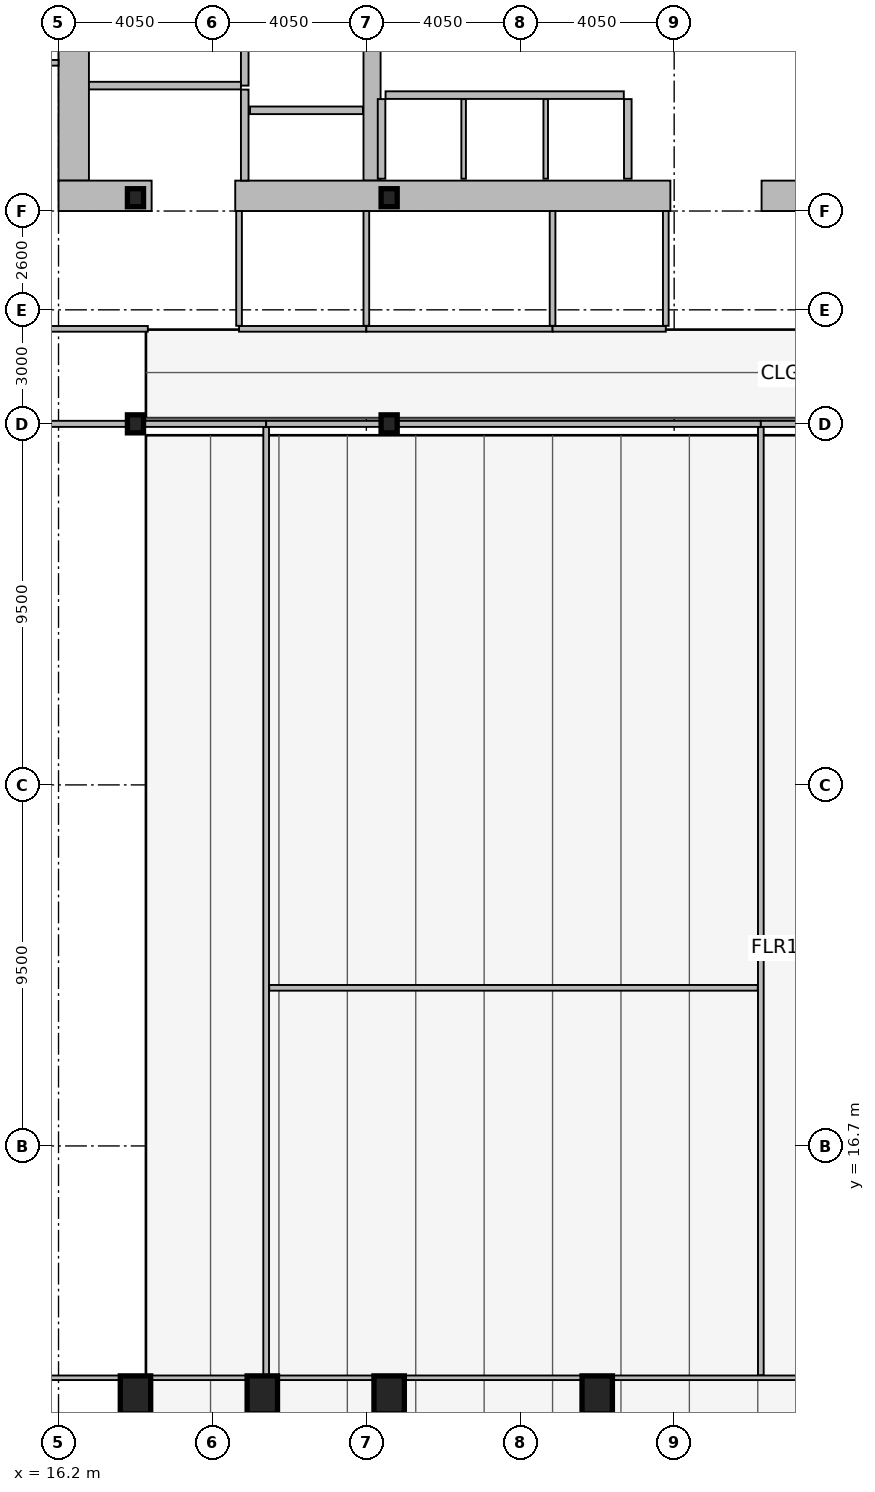
"""IFC4 building model, lengths in metres.
Left out: names, types, materials, properties, quantities, classifications, styles, units other than length and angle.
Written with IfcOpenShell. Run it as: python <this file> out.ifc"""

import sys

from ifc_helpers import new_model, si_unit, direction, frame, frame_2d, origin, origin_2d, place, context, subcontext, project, spatial, rectangle, hollow_rectangle, i_section, extrude, element, fill, save


model = new_model("IFC4")
c1 = context("Model", 3, precision=1e-05, world=origin(), true_north=direction((0.0, 1.0)))
c2 = subcontext(c1, "Body", "Model", "MODEL_VIEW")
j1 = project(units=[si_unit("LENGTHUNIT", "METRE"), si_unit("PLANEANGLEUNIT", "RADIAN")], contexts=[c1])
p1 = place(None, origin())
s1 = spatial("IfcSite", under=j1, at=p1, CompositionType="ELEMENT")
p2 = place(p1, origin())
s2 = spatial("IfcBuilding", under=s1, at=p2, CompositionType="ELEMENT")
p3 = place(p2, frame((0.0, 0.0, 61.8)))
s3 = spatial("IfcBuildingStorey", under=s2, at=p3, CompositionType="ELEMENT", Elevation=61.8)
p4 = place(p3, frame((16.6, 42.1, 0.0), z_axis=(0.0, 0.0, 1.0), x_axis=(0.0, 1.0, 0.0)))
e1 = element("IfcWall", 1, at=p4, inside=s3, PredefinedType="SHEAR", context=c2, shape_type="SweptSolid", body=[
    extrude(rectangle(XDim=10.8, YDim=0.8, at=frame_2d((5.4, 0.0))), origin(), (0.0, 0.0, 1.0), 3.82),
])
p5 = place(p3, frame((24.45, 42.1, 0.0), z_axis=(0.0, 0.0, 1.0), x_axis=(0.0, 1.0, 0.0)))
e2 = element("IfcWall", 2, at=p5, inside=s3, PredefinedType="SHEAR", context=c2, shape_type="SweptSolid", body=[
    extrude(rectangle(XDim=10.8, YDim=0.45, at=frame_2d((5.4, 0.0))), origin(), (0.0, 0.0, 1.0), 3.82),
])
p6 = place(p3, frame((18.65, 41.7, 0.0), z_axis=(0.0, 0.0, 1.0), x_axis=(-1.0, 0.0, 0.0)))
e3 = element("IfcWall", 3, at=p6, inside=s3, PredefinedType="SHEAR", context=c2, shape_type="SweptSolid", body=[
    extrude(rectangle(XDim=2.45, YDim=0.8, at=frame_2d((1.225, 0.0))), origin(), (0.0, 0.0, 1.0), 3.82),
])
p7 = place(p3, frame((32.3, 41.7, 0.0), z_axis=(0.0, 0.0, 1.0), x_axis=(-1.0, 0.0, 0.0)))
e4 = element("IfcWall", 4, at=p7, inside=s3, PredefinedType="SHEAR", context=c2, shape_type="SweptSolid", body=[
    extrude(rectangle(XDim=11.45, YDim=0.8, at=frame_2d((5.725, 0.0))), origin(), (0.0, 0.0, 1.0), 3.82),
])
p8 = place(p3, frame((38.45, 41.7, 0.0), z_axis=(0.0, 0.0, 1.0), x_axis=(-1.0, 0.0, 0.0)))
e5 = element("IfcWall", 5, at=p8, inside=s3, PredefinedType="SHEAR", context=c2, shape_type="SweptSolid", body=[
    extrude(rectangle(XDim=3.75, YDim=0.8, at=frame_2d((1.875, 0.0))), origin(), (0.0, 0.0, 1.0), 3.82),
])
for number, where, z_axis, x_axis in (
    (6, (18.225, 10.15, 0.0), (0.0, 0.0, 1.0), (1.0, 0.0, 0.0)),
    (7, (21.562, 10.15, 0.0), (0.0, 0.0, 1.0), (1.0, 0.0, 0.0)),
    (8, (24.9, 10.15, 0.0), (0.0, 0.0, 1.0), (1.0, 0.0, 0.0)),
    (9, (30.375, 10.15, 0.0), (0.0, 0.0, 1.0), (1.0, 0.0, 0.0)),
):
    element("IfcColumn", number, at=place(p3, frame(where, z_axis=z_axis, x_axis=x_axis)), inside=s3, PredefinedType="COLUMN", context=c2, shape_type="SweptSolid", body=[
        extrude(hollow_rectangle(XDim=0.8, YDim=1.0, WallThickness=0.055, at=origin_2d()), origin(), (0.0, 0.0, 1.0), 4.0),
    ])
for number, where, z_axis, x_axis in (
    (10, (18.225, 35.7, 0.0), (0.0, 0.0, 1.0), (1.0, 0.0, 0.0)),
    (11, (18.225, 41.65, 0.0), (0.0, 0.0, 1.0), (1.0, 0.0, 0.0)),
    (12, (24.9, 35.7, 0.0), (0.0, 0.0, 1.0), (1.0, 0.0, 0.0)),
    (13, (24.9, 41.65, 0.0), (0.0, 0.0, 1.0), (1.0, 0.0, 0.0)),
):
    element("IfcColumn", number, at=place(p3, frame(where, z_axis=z_axis, x_axis=x_axis)), inside=s3, PredefinedType="COLUMN", context=c2, shape_type="SweptSolid", body=[
        extrude(i_section(OverallWidth=0.424, OverallDepth=0.474, WebThickness=0.048, FlangeThickness=0.077, at=origin_2d()), origin(), (0.0, 0.0, 1.0), 4.0),
    ])
p9 = place(p3, frame((24.21, 43.95, 0.0), z_axis=(0.0, 0.0, 1.0), x_axis=(-1.0, 0.0, 0.0)))
e14 = element("IfcWall", 14, at=p9, inside=s3, PredefinedType="PARTITIONING", context=c2, shape_type="SweptSolid", body=[
    extrude(rectangle(XDim=2.97, YDim=0.2, at=frame_2d((1.485, 0.0))), origin(), (0.0, 0.0, 1.0), 3.82),
])
p10 = place(p9, frame((0.86, 0.0, 0.0)))
e15 = element("IfcOpeningElement", 15, at=p10, cuts=e14, PredefinedType="OPENING", context=c2, shape_type="SweptSolid", body=[
    extrude(rectangle(XDim=1.3, YDim=2.18, at=frame_2d((0.65, 1.09))), frame((0.0, 0.11, 0.0), z_axis=(0.0, -1.0, 0.0), x_axis=(1.0, 0.0, 0.0)), (0.0, 0.0, 1.0), 0.22),
])
p11 = place(p3, frame((21.1, 44.6, 0.0), z_axis=(0.0, 0.0, 1.0), x_axis=(0.0, 1.0, 0.0)))
e16 = element("IfcWall", 16, at=p11, inside=s3, PredefinedType="PARTITIONING", context=c2, shape_type="SweptSolid", body=[
    extrude(rectangle(XDim=4.3, YDim=0.2, at=frame_2d((2.15, 0.0))), origin(), (0.0, 0.0, 1.0), 3.82),
])
p12 = place(p3, frame((17.0, 44.6, 0.0), z_axis=(0.0, 0.0, 1.0), x_axis=(1.0, 0.0, 0.0)))
e17 = element("IfcWall", 17, at=p12, inside=s3, PredefinedType="PARTITIONING", context=c2, shape_type="SweptSolid", body=[
    extrude(rectangle(XDim=4.0, YDim=0.2, at=frame_2d((2.0, 0.0))), origin(), (0.0, 0.0, 1.0), 3.82),
])
p13 = place(p12, frame((1.25, 0.0, 0.0)))
e18 = element("IfcOpeningElement", 18, at=p13, cuts=e17, PredefinedType="OPENING", context=c2, shape_type="SweptSolid", body=[
    extrude(rectangle(XDim=1.05, YDim=2.15, at=frame_2d((0.525, 1.075))), frame((0.0, 0.11, 0.0), z_axis=(0.0, -1.0, 0.0), x_axis=(1.0, 0.0, 0.0)), (0.0, 0.0, 1.0), 0.22),
])
p14 = place(p3, frame((21.1, 42.1, 0.0), z_axis=(0.0, 0.0, 1.0), x_axis=(0.0, 1.0, 0.0)))
e19 = element("IfcWall", 19, at=p14, inside=s3, PredefinedType="PARTITIONING", context=c2, shape_type="SweptSolid", body=[
    extrude(rectangle(XDim=2.395, YDim=0.2, at=frame_2d((1.198, 0.0))), origin(), (0.0, 0.0, 1.0), 3.82),
])
p15 = place(p14, frame((0.38, 0.0, 0.0)))
e20 = element("IfcOpeningElement", 20, at=p15, cuts=e19, PredefinedType="OPENING", context=c2, shape_type="SweptSolid", body=[
    extrude(rectangle(XDim=1.05, YDim=2.15, at=frame_2d((0.525, 1.075))), frame((0.0, 0.11, 0.0), z_axis=(0.0, -1.0, 0.0), x_axis=(1.0, 0.0, 0.0)), (0.0, 0.0, 1.0), 0.22),
])
p16 = place(p3, frame((24.805, 44.35, 0.0), z_axis=(0.0, 0.0, 1.0), x_axis=(1.0, 0.0, 0.0)))
e21 = element("IfcWall", 21, at=p16, inside=s3, PredefinedType="PARTITIONING", context=c2, shape_type="SweptSolid", body=[
    extrude(rectangle(XDim=6.27, YDim=0.2, at=frame_2d((3.135, 0.0))), origin(), (0.0, 0.0, 1.0), 3.82),
])
for number, where, z_axis, x_axis in (
    (22, (24.7, 42.15, 0.0), (0.0, 0.0, 1.0), (0.0, 1.0, 0.0)),
    (23, (31.18, 42.15, 0.0), (0.0, 0.0, 1.0), (0.0, 1.0, 0.0)),
):
    element("IfcWall", number, at=place(p3, frame(where, z_axis=z_axis, x_axis=x_axis)), inside=s3, PredefinedType="PARTITIONING", context=c2, shape_type="SweptSolid", body=[
        extrude(rectangle(XDim=2.095, YDim=0.2, at=frame_2d((1.048, 0.0))), origin(), (0.0, 0.0, 1.0), 3.82),
    ])
for number, where, z_axis, x_axis in (
    (24, (26.86, 42.15, 0.0), (0.0, 0.0, 1.0), (0.0, 1.0, 0.0)),
    (25, (29.02, 42.15, 0.0), (0.0, 0.0, 1.0), (0.0, 1.0, 0.0)),
):
    element("IfcWall", number, at=place(p3, frame(where, z_axis=z_axis, x_axis=x_axis)), inside=s3, PredefinedType="PARTITIONING", context=c2, shape_type="SweptSolid", body=[
        extrude(rectangle(XDim=2.095, YDim=0.12, at=frame_2d((1.048, 0.0))), origin(), (0.0, 0.0, 1.0), 3.82),
    ])
p17 = place(p3, frame((20.95, 38.2, 0.0), z_axis=(0.0, 0.0, 1.0), x_axis=(1.0, 0.0, 0.0)))
e26 = element("IfcWall", 26, at=p17, inside=s3, PredefinedType="PARTITIONING", context=c2, shape_type="SweptSolid", body=[
    extrude(rectangle(XDim=3.35, YDim=0.15, at=frame_2d((1.675, 0.0))), origin(), (0.0, 0.0, 1.0), 3.82),
])
p18 = place(p17, frame((0.9, 0.0, 0.0)))
e27 = element("IfcOpeningElement", 27, at=p18, cuts=e26, PredefinedType="OPENING", context=c2, shape_type="SweptSolid", body=[
    extrude(rectangle(XDim=0.95, YDim=2.05, at=frame_2d((0.475, 1.025))), frame((0.0, 0.085, 0.0), z_axis=(0.0, -1.0, 0.0), x_axis=(1.0, 0.0, 0.0)), (0.0, 0.0, 1.0), 0.17),
])
p19 = place(p3, frame((24.3, 38.2, 0.0), z_axis=(0.0, 0.0, 1.0), x_axis=(1.0, 0.0, 0.0)))
e28 = element("IfcWall", 28, at=p19, inside=s3, PredefinedType="PARTITIONING", context=c2, shape_type="SweptSolid", body=[
    extrude(rectangle(XDim=4.9, YDim=0.15, at=frame_2d((2.45, 0.0))), origin(), (0.0, 0.0, 1.0), 3.01),
])
p20 = place(p19, frame((0.9, 0.0, 0.0)))
e29 = element("IfcOpeningElement", 29, at=p20, cuts=e28, PredefinedType="OPENING", context=c2, shape_type="SweptSolid", body=[
    extrude(rectangle(XDim=0.95, YDim=2.05, at=frame_2d((0.475, 1.025))), frame((0.0, 0.085, 0.0), z_axis=(0.0, -1.0, 0.0), x_axis=(1.0, 0.0, 0.0)), (0.0, 0.0, 1.0), 0.17),
])
p21 = place(p3, frame((29.2, 38.2, 0.0), z_axis=(0.0, 0.0, 1.0), x_axis=(1.0, 0.0, 0.0)))
e30 = element("IfcWall", 30, at=p21, inside=s3, PredefinedType="PARTITIONING", context=c2, shape_type="SweptSolid", body=[
    extrude(rectangle(XDim=2.98, YDim=0.15, at=frame_2d((1.49, 0.0))), origin(), (0.0, 0.0, 1.0), 3.01),
])
p22 = place(p21, frame((0.7, 0.0, 0.0)))
e31 = element("IfcOpeningElement", 31, at=p22, cuts=e30, PredefinedType="OPENING", context=c2, shape_type="SweptSolid", body=[
    extrude(rectangle(XDim=0.95, YDim=2.05, at=frame_2d((0.475, 1.025))), frame((0.0, 0.085, 0.0), z_axis=(0.0, -1.0, 0.0), x_axis=(1.0, 0.0, 0.0)), (0.0, 0.0, 1.0), 0.17),
])
for number, where, z_axis, x_axis in (
    (32, (20.95, 38.28, 0.0), (0.0, 0.0, 1.0), (0.0, 1.0, 0.0)),
    (33, (24.3, 38.28, 0.0), (0.0, 0.0, 1.0), (0.0, 1.0, 0.0)),
    (34, (29.2, 38.28, 0.0), (0.0, 0.0, 1.0), (0.0, 1.0, 0.0)),
    (35, (32.18, 38.28, 0.0), (0.0, 0.0, 1.0), (0.0, 1.0, 0.0)),
):
    element("IfcWall", number, at=place(p3, frame(where, z_axis=z_axis, x_axis=x_axis)), inside=s3, PredefinedType="PARTITIONING", context=c2, shape_type="SweptSolid", body=[
        extrude(rectangle(XDim=3.02, YDim=0.15, at=frame_2d((1.51, 0.0))), origin(), (0.0, 0.0, 1.0), 3.82),
    ])
p23 = place(p3, frame((2.03, 38.2, 0.0), z_axis=(0.0, 0.0, 1.0), x_axis=(1.0, 0.0, 0.0)))
e36 = element("IfcWall", 36, at=p23, inside=s3, PredefinedType="PARTITIONING", context=c2, shape_type="SweptSolid", body=[
    extrude(rectangle(XDim=16.52, YDim=0.15, at=frame_2d((8.26, 0.0))), origin(), (0.0, 0.0, 1.0), 3.01),
])
p24 = place(p23, frame((12.32, 0.0, 0.0)))
e37 = element("IfcOpeningElement", 37, at=p24, cuts=e36, PredefinedType="OPENING", context=c2, shape_type="SweptSolid", body=[
    extrude(rectangle(XDim=0.95, YDim=2.05, at=frame_2d((0.475, 1.025))), frame((0.0, 0.085, 0.0), z_axis=(0.0, -1.0, 0.0), x_axis=(1.0, 0.0, 0.0)), (0.0, 0.0, 1.0), 0.17),
])
p25 = place(p3, frame((2.095, 45.2, 0.0), z_axis=(0.0, 0.0, 1.0), x_axis=(1.0, 0.0, 0.0)))
e38 = element("IfcWall", 38, at=p25, inside=s3, PredefinedType="PARTITIONING", context=c2, shape_type="SweptSolid", body=[
    extrude(rectangle(XDim=14.105, YDim=0.15, at=frame_2d((7.052, 0.0))), origin(), (0.0, 0.0, 1.0), 3.16),
])
p26 = place(p25, frame((12.32, 0.0, 0.0)))
e39 = element("IfcOpeningElement", 39, at=p26, cuts=e38, PredefinedType="OPENING", context=c2, shape_type="SweptSolid", body=[
    extrude(rectangle(XDim=0.9, YDim=2.05, at=frame_2d((0.45, 1.025))), frame((0.0, 0.085, 0.0), z_axis=(0.0, -1.0, 0.0), x_axis=(1.0, 0.0, 0.0)), (0.0, 0.0, 1.0), 0.17),
])
p27 = place(p3, frame((10.844, 35.7, 0.0), z_axis=(0.0, 0.0, 1.0), x_axis=(1.0, 0.0, 0.0)))
e40 = element("IfcWall", 40, at=p27, inside=s3, PredefinedType="PARTITIONING", context=c2, shape_type="SweptSolid", body=[
    extrude(rectangle(XDim=10.82, YDim=0.16, at=frame_2d((5.41, 0.0))), origin(), (0.0, 0.0, 1.0), 3.01),
])
p28 = place(p27, frame((4.794, 0.0, 0.0)))
e41 = element("IfcOpeningElement", 41, at=p28, cuts=e40, PredefinedType="OPENING", context=c2, shape_type="SweptSolid", body=[
    extrude(rectangle(XDim=1.0, YDim=2.05, at=frame_2d((0.5, 1.025))), frame((0.0, 0.09, 0.0), z_axis=(0.0, -1.0, 0.0), x_axis=(1.0, 0.0, 0.0)), (0.0, 0.0, 1.0), 0.18),
])
p29 = place(p3, frame((21.664, 35.7, 0.0), z_axis=(0.0, 0.0, 1.0), x_axis=(1.0, 0.0, 0.0)))
e42 = element("IfcWall", 42, at=p29, inside=s3, PredefinedType="PARTITIONING", context=c2, shape_type="SweptSolid", body=[
    extrude(rectangle(XDim=13.017, YDim=0.16, at=frame_2d((6.508, 0.0))), origin(), (0.0, 0.0, 1.0), 3.01),
])
p30 = place(p29, frame((5.717, 0.0, 0.0)))
e43 = element("IfcOpeningElement", 43, at=p30, cuts=e42, PredefinedType="OPENING", context=c2, shape_type="SweptSolid", body=[
    extrude(rectangle(XDim=1.0, YDim=2.05, at=frame_2d((0.5, 1.025))), frame((0.0, 0.09, 0.0), z_axis=(0.0, -1.0, 0.0), x_axis=(1.0, 0.0, 0.0)), (0.0, 0.0, 1.0), 0.18),
])
p31 = place(p3, frame((21.664, 10.665, 0.0), z_axis=(0.0, 0.0, 1.0), x_axis=(0.0, 1.0, 0.0)))
e44 = element("IfcWall", 44, at=p31, inside=s3, PredefinedType="PARTITIONING", context=c2, shape_type="SweptSolid", body=[
    extrude(rectangle(XDim=24.95, YDim=0.15, at=frame_2d((12.475, 0.0))), origin(), (0.0, 0.0, 1.0), 3.21),
])
p32 = place(p3, frame((21.744, 20.861, 0.0), z_axis=(0.0, 0.0, 1.0), x_axis=(1.0, 0.0, 0.0)))
e45 = element("IfcWall", 45, at=p32, inside=s3, PredefinedType="PARTITIONING", context=c2, shape_type="SweptSolid", body=[
    extrude(rectangle(XDim=12.857, YDim=0.15, at=frame_2d((6.428, 0.0))), origin(), (0.0, 0.0, 1.0), 3.01),
])
p33 = place(p32, frame((5.858, 0.0, 0.0)))
e46 = element("IfcOpeningElement", 46, at=p33, cuts=e45, PredefinedType="OPENING", context=c2, shape_type="SweptSolid", body=[
    extrude(rectangle(XDim=0.9, YDim=2.05, at=frame_2d((0.45, 1.025))), frame((0.0, 0.085, 0.0), z_axis=(0.0, -1.0, 0.0), x_axis=(1.0, 0.0, 0.0)), (0.0, 0.0, 1.0), 0.17),
])
p34 = place(p3, frame((34.68, 35.7, 0.0), z_axis=(0.0, 0.0, 1.0), x_axis=(1.0, 0.0, 0.0)))
e47 = element("IfcWall", 47, at=p34, inside=s3, PredefinedType="PARTITIONING", context=c2, shape_type="SweptSolid", body=[
    extrude(rectangle(XDim=7.81, YDim=0.16, at=frame_2d((3.905, 0.0))), origin(), (0.0, 0.0, 1.0), 3.01),
])
p35 = place(p34, frame((3.53, 0.0, 0.0)))
e48 = element("IfcOpeningElement", 48, at=p35, cuts=e47, PredefinedType="OPENING", context=c2, shape_type="SweptSolid", body=[
    extrude(rectangle(XDim=1.0, YDim=2.05, at=frame_2d((0.5, 1.025))), frame((0.0, 0.09, 0.0), z_axis=(0.0, -1.0, 0.0), x_axis=(1.0, 0.0, 0.0)), (0.0, 0.0, 1.0), 0.18),
])
p36 = place(p3, frame((34.68, 10.665, 0.0), z_axis=(0.0, 0.0, 1.0), x_axis=(0.0, 1.0, 0.0)))
e49 = element("IfcWall", 49, at=p36, inside=s3, PredefinedType="PARTITIONING", context=c2, shape_type="SweptSolid", body=[
    extrude(rectangle(XDim=24.95, YDim=0.15, at=frame_2d((12.475, 0.0))), origin(), (0.0, 0.0, 1.0), 3.21),
])
p37 = place(p3, frame((2.095, 10.6, 0.0), z_axis=(0.0, 0.0, 1.0), x_axis=(1.0, 0.0, 0.0)))
e50 = element("IfcWall", 50, at=p37, inside=s3, PredefinedType="PARTITIONING", context=c2, shape_type="SweptSolid", body=[
    extrude(rectangle(XDim=68.71, YDim=0.12, at=frame_2d((34.355, 0.0))), origin(), (0.0, 0.0, 1.0), 3.01),
])
p38 = place(p10, origin())
e51 = element("IfcDoor", 51, at=p38, inside=s3, OperationType="SLIDING_TO_LEFT", PredefinedType="DOOR", context=c2, shape_type="SweptSolid", body=[
    extrude(rectangle(XDim=1.3, YDim=2.18, at=frame_2d((0.65, 1.09))), frame((0.0, 0.025, 0.0), z_axis=(0.0, -1.0, 0.0), x_axis=(1.0, 0.0, 0.0)), (0.0, 0.0, 1.0), 0.05),
])
fill(e15, e51)
p39 = place(p13, origin())
e52 = element("IfcDoor", 52, at=p39, inside=s3, OperationType="SINGLE_SWING_RIGHT", PredefinedType="DOOR", context=c2, shape_type="SweptSolid", body=[
    extrude(rectangle(XDim=1.05, YDim=2.15, at=frame_2d((0.525, 1.075))), frame((0.0, 0.025, 0.0), z_axis=(0.0, -1.0, 0.0), x_axis=(1.0, 0.0, 0.0)), (0.0, 0.0, 1.0), 0.05),
])
fill(e18, e52)
p40 = place(p15, origin())
e53 = element("IfcDoor", 53, at=p40, inside=s3, OperationType="SINGLE_SWING_LEFT", PredefinedType="DOOR", context=c2, shape_type="SweptSolid", body=[
    extrude(rectangle(XDim=1.05, YDim=2.15, at=frame_2d((0.525, 1.075))), frame((0.0, 0.025, 0.0), z_axis=(0.0, -1.0, 0.0), x_axis=(1.0, 0.0, 0.0)), (0.0, 0.0, 1.0), 0.05),
])
fill(e20, e53)
p41 = place(p18, origin())
e54 = element("IfcDoor", 54, at=p41, inside=s3, OperationType="SINGLE_SWING_RIGHT", PredefinedType="DOOR", context=c2, shape_type="SweptSolid", body=[
    extrude(rectangle(XDim=0.95, YDim=2.05, at=frame_2d((0.475, 1.025))), frame((0.0, 0.025, 0.0), z_axis=(0.0, -1.0, 0.0), x_axis=(1.0, 0.0, 0.0)), (0.0, 0.0, 1.0), 0.05),
])
fill(e27, e54)
p42 = place(p20, origin())
e55 = element("IfcDoor", 55, at=p42, inside=s3, OperationType="SINGLE_SWING_LEFT", PredefinedType="DOOR", context=c2, shape_type="SweptSolid", body=[
    extrude(rectangle(XDim=0.95, YDim=2.05, at=frame_2d((0.475, 1.025))), frame((0.0, 0.025, 0.0), z_axis=(0.0, -1.0, 0.0), x_axis=(1.0, 0.0, 0.0)), (0.0, 0.0, 1.0), 0.05),
])
fill(e29, e55)
p43 = place(p22, origin())
e56 = element("IfcDoor", 56, at=p43, inside=s3, OperationType="SINGLE_SWING_RIGHT", PredefinedType="DOOR", context=c2, shape_type="SweptSolid", body=[
    extrude(rectangle(XDim=0.95, YDim=2.05, at=frame_2d((0.475, 1.025))), frame((0.0, 0.025, 0.0), z_axis=(0.0, -1.0, 0.0), x_axis=(1.0, 0.0, 0.0)), (0.0, 0.0, 1.0), 0.05),
])
fill(e31, e56)
p44 = place(p28, origin())
e57 = element("IfcDoor", 57, at=p44, inside=s3, OperationType="SINGLE_SWING_LEFT", PredefinedType="DOOR", context=c2, shape_type="SweptSolid", body=[
    extrude(rectangle(XDim=1.0, YDim=2.05, at=frame_2d((0.5, 1.025))), frame((0.0, 0.025, 0.0), z_axis=(0.0, -1.0, 0.0), x_axis=(1.0, 0.0, 0.0)), (0.0, 0.0, 1.0), 0.05),
])
fill(e41, e57)
p45 = place(p30, origin())
e58 = element("IfcDoor", 58, at=p45, inside=s3, OperationType="SINGLE_SWING_RIGHT", PredefinedType="DOOR", context=c2, shape_type="SweptSolid", body=[
    extrude(rectangle(XDim=1.0, YDim=2.05, at=frame_2d((0.5, 1.025))), frame((0.0, 0.025, 0.0), z_axis=(0.0, -1.0, 0.0), x_axis=(1.0, 0.0, 0.0)), (0.0, 0.0, 1.0), 0.05),
])
fill(e43, e58)
p46 = place(p33, origin())
e59 = element("IfcDoor", 59, at=p46, inside=s3, OperationType="SINGLE_SWING_LEFT", PredefinedType="DOOR", context=c2, shape_type="SweptSolid", body=[
    extrude(rectangle(XDim=0.9, YDim=2.05, at=frame_2d((0.45, 1.025))), frame((0.0, 0.025, 0.0), z_axis=(0.0, -1.0, 0.0), x_axis=(1.0, 0.0, 0.0)), (0.0, 0.0, 1.0), 0.05),
])
fill(e46, e59)
save(model, sys.argv[1])
